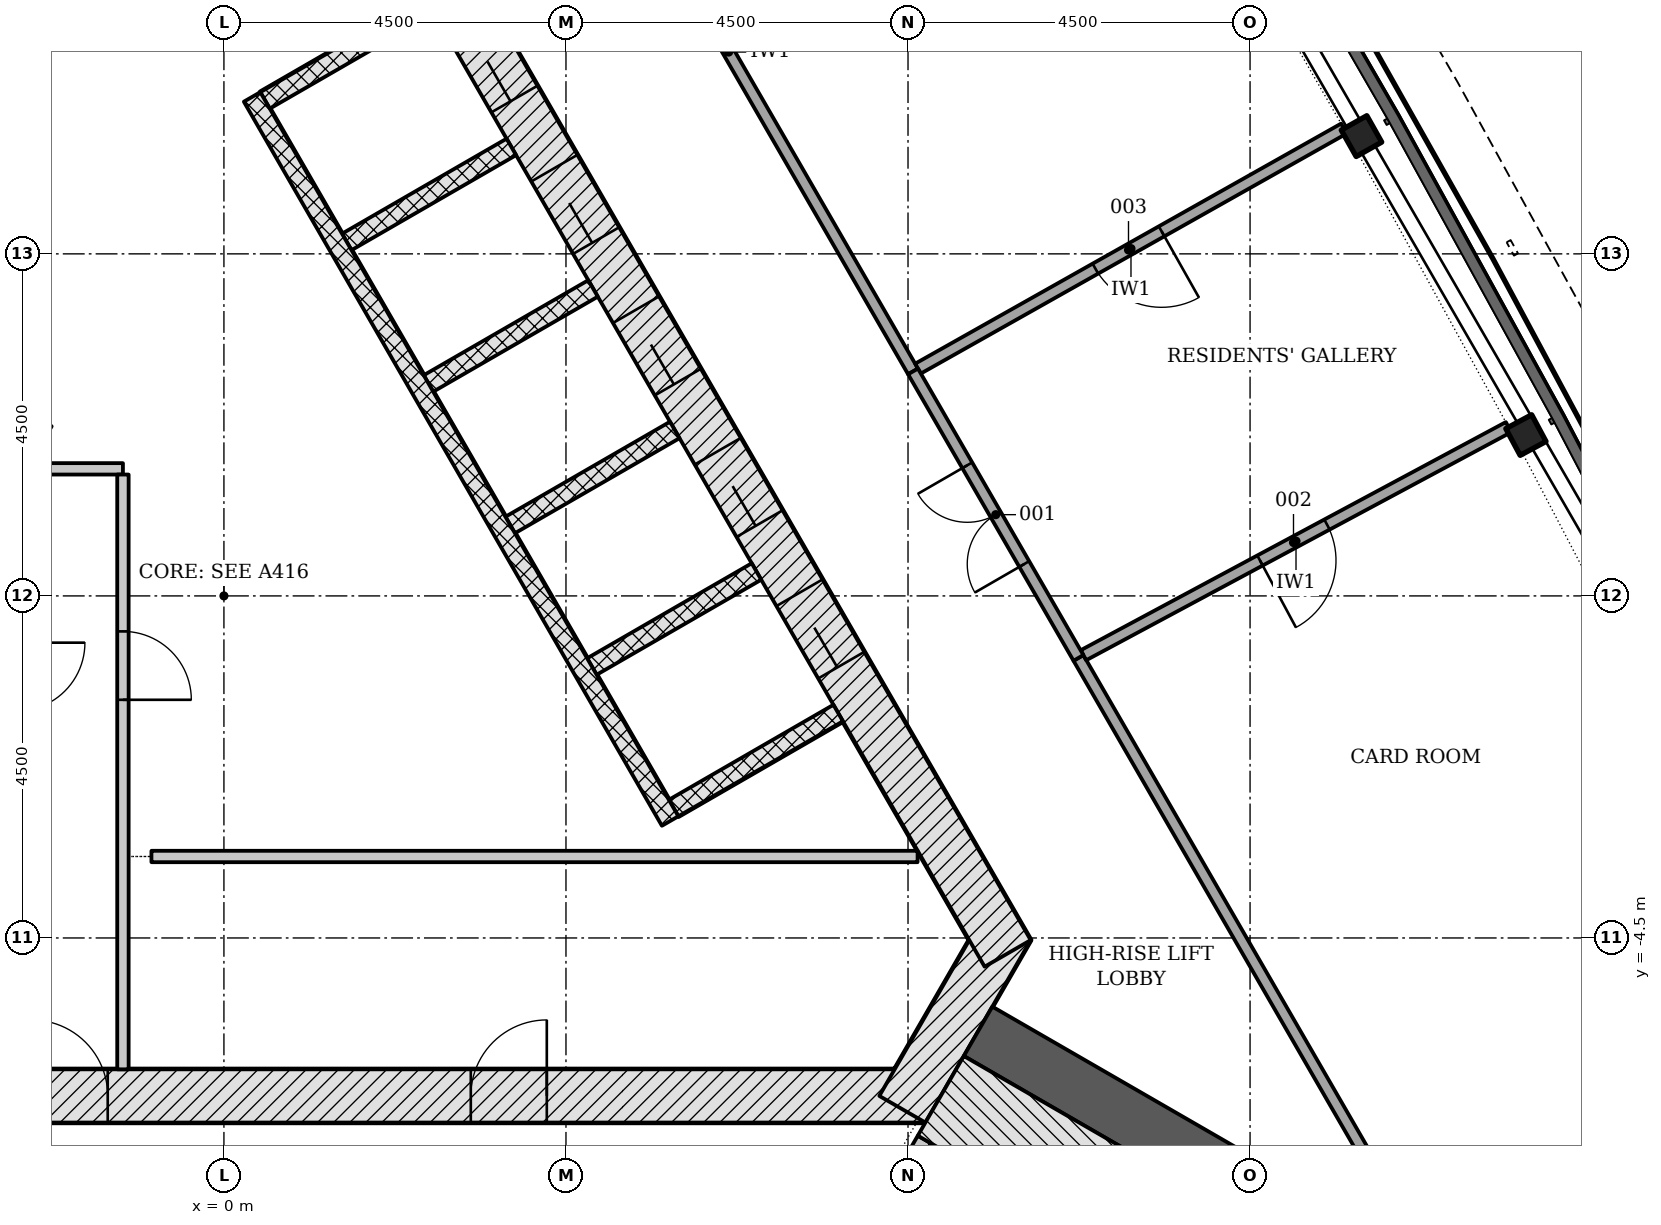
"""IFC4 building model, lengths in metres.
Left out: names, types, materials, properties, quantities, classifications, styles, units other than length and angle.
Written with IfcOpenShell. Run it as: python <this file> out.ifc"""

import sys

from ifc_helpers import new_model, si_unit, direction, frame, frame_2d, origin, origin_2d, place, context, subcontext, project, spatial, polyline, rectangle, i_section, outline, extrude, element, fill, save


model = new_model("IFC4")
c1 = context("Model", 3, precision=1e-05, world=origin(), true_north=direction((0.0, 1.0)))
c2 = subcontext(c1, "Body", "Model", "MODEL_VIEW")
j1 = project(units=[si_unit("LENGTHUNIT", "METRE"), si_unit("PLANEANGLEUNIT", "RADIAN")], contexts=[c1])
p1 = place(None, origin())
s1 = spatial("IfcSite", under=j1, at=p1, CompositionType="ELEMENT")
p2 = place(p1, origin())
s2 = spatial("IfcBuilding", under=s1, at=p2, CompositionType="ELEMENT")
p3 = place(p2, frame((0.0, 0.0, 150.9)))
s3 = spatial("IfcBuildingStorey", under=s2, at=p3, CompositionType="ELEMENT", Elevation=150.9)
p4 = place(p3, frame((-9.229, -6.578, -0.2), z_axis=(0.0, 0.0, 1.0), x_axis=(1.0, 0.0, 0.0)))
e1 = element("IfcWall", 1, at=p4, inside=s3, PredefinedType="SHEAR", context=c2, shape_type="SweptSolid", body=[
    extrude(rectangle(XDim=18.458, YDim=0.7, at=frame_2d((9.229, 0.0))), origin(), (0.0, 0.0, 1.0), 3.6),
])
p5 = place(p4, frame((6.7, 0.0, 0.2)))
e2 = element("IfcOpeningElement", 2, at=p5, cuts=e1, PredefinedType="OPENING", context=c2, shape_type="SweptSolid", body=[
    extrude(rectangle(XDim=1.0, YDim=2.1, at=frame_2d((0.5, 1.05))), frame((0.0, 0.36, 0.0), z_axis=(0.0, -1.0, 0.0), x_axis=(1.0, 0.0, 0.0)), (0.0, 0.0, 1.0), 0.72),
])
p6 = place(p4, frame((1.452, 0.0, 0.2)))
e3 = element("IfcOpeningElement", 3, at=p6, cuts=e1, PredefinedType="OPENING", context=c2, shape_type="SweptSolid", body=[
    extrude(rectangle(XDim=0.9, YDim=2.1, at=frame_2d((0.45, 1.05))), frame((0.0, 0.36, 0.0), z_axis=(0.0, -1.0, 0.0), x_axis=(1.0, 0.0, 0.0)), (0.0, 0.0, 1.0), 0.72),
])
p7 = place(p4, frame((4.45, 0.0, 0.2)))
e4 = element("IfcOpeningElement", 4, at=p7, cuts=e1, PredefinedType="OPENING", context=c2, shape_type="SweptSolid", body=[
    extrude(rectangle(XDim=1.0, YDim=2.1, at=frame_2d((0.5, 1.05))), frame((0.0, 0.36, 0.0), z_axis=(0.0, -1.0, 0.0), x_axis=(1.0, 0.0, 0.0)), (0.0, 0.0, 1.0), 0.72),
])
p8 = place(p4, frame((12.477, 0.0, 0.2)))
e5 = element("IfcOpeningElement", 5, at=p8, cuts=e1, PredefinedType="OPENING", context=c2, shape_type="SweptSolid", body=[
    extrude(rectangle(XDim=1.0, YDim=2.1, at=frame_2d((0.5, 1.05))), frame((0.0, 0.36, 0.0), z_axis=(0.0, -1.0, 0.0), x_axis=(1.0, 0.0, 0.0)), (0.0, 0.0, 1.0), 0.72),
])
p9 = place(p3, frame((8.926, -6.753, -0.2), z_axis=(0.0, 0.0, 1.0), x_axis=(0.500042739161, 0.866000726912, 0.0)))
e6 = element("IfcWall", 6, at=p9, inside=s3, PredefinedType="SHEAR", context=c2, shape_type="SweptSolid", body=[
    extrude(rectangle(XDim=2.771, YDim=0.7, at=frame_2d((1.386, 0.0))), origin(), (0.0, 0.0, 1.0), 3.6),
])
p10 = place(p3, frame((10.311, -4.703, -0.2), z_axis=(0.0, 0.0, 1.0), x_axis=(-0.500001446645, 0.866024568562, 0.0)))
e7 = element("IfcWall", 7, at=p10, inside=s3, PredefinedType="SHEAR", context=c2, shape_type="SweptSolid", body=[
    extrude(rectangle(XDim=18.458, YDim=0.7, at=frame_2d((9.229, 0.0))), origin(), (0.0, 0.0, 1.0), 3.6),
])
p11 = place(p10, frame((4.379, 0.0, 0.2)))
e8 = element("IfcOpeningElement", 8, at=p11, cuts=e7, PredefinedType="OPENING", context=c2, shape_type="SweptSolid", body=[
    extrude(rectangle(XDim=1.1, YDim=2.1, at=frame_2d((0.55, 1.05))), frame((0.0, 0.36, 0.0), z_axis=(0.0, -1.0, 0.0), x_axis=(1.0, 0.0, 0.0)), (0.0, 0.0, 1.0), 0.72),
])
p12 = place(p10, frame((6.529, 0.0, 0.2)))
e9 = element("IfcOpeningElement", 9, at=p12, cuts=e7, PredefinedType="OPENING", context=c2, shape_type="SweptSolid", body=[
    extrude(rectangle(XDim=1.1, YDim=2.1, at=frame_2d((0.55, 1.05))), frame((0.0, 0.36, 0.0), z_axis=(0.0, -1.0, 0.0), x_axis=(1.0, 0.0, 0.0)), (0.0, 0.0, 1.0), 0.72),
])
p13 = place(p10, frame((8.679, 0.0, 0.2)))
e10 = element("IfcOpeningElement", 10, at=p13, cuts=e7, PredefinedType="OPENING", context=c2, shape_type="SweptSolid", body=[
    extrude(rectangle(XDim=1.1, YDim=2.1, at=frame_2d((0.55, 1.05))), frame((0.0, 0.36, 0.0), z_axis=(0.0, -1.0, 0.0), x_axis=(1.0, 0.0, 0.0)), (0.0, 0.0, 1.0), 0.72),
])
p14 = place(p10, frame((10.829, 0.0, 0.2)))
e11 = element("IfcOpeningElement", 11, at=p14, cuts=e7, PredefinedType="OPENING", context=c2, shape_type="SweptSolid", body=[
    extrude(rectangle(XDim=1.1, YDim=2.1, at=frame_2d((0.55, 1.05))), frame((0.0, 0.36, 0.0), z_axis=(0.0, -1.0, 0.0), x_axis=(1.0, 0.0, 0.0)), (0.0, 0.0, 1.0), 0.72),
])
p15 = place(p10, frame((12.979, 0.0, 0.2)))
e12 = element("IfcOpeningElement", 12, at=p15, cuts=e7, PredefinedType="OPENING", context=c2, shape_type="SweptSolid", body=[
    extrude(rectangle(XDim=1.1, YDim=2.1, at=frame_2d((0.55, 1.05))), frame((0.0, 0.36, 0.0), z_axis=(0.0, -1.0, 0.0), x_axis=(1.0, 0.0, 0.0)), (0.0, 0.0, 1.0), 0.72),
])
p16 = place(p3, frame((-1.083, 11.281, -0.2), z_axis=(0.0, 0.0, 1.0), x_axis=(-0.500001446645, -0.866024568562, 0.0)))
e13 = element("IfcWall", 13, at=p16, inside=s3, PredefinedType="SHEAR", context=c2, shape_type="SweptSolid", body=[
    extrude(rectangle(XDim=18.458, YDim=0.7, at=frame_2d((9.229, 0.0))), origin(), (0.0, 0.0, 1.0), 3.6),
])
p17 = place(p16, frame((8.979, 0.0, 0.2)))
e14 = element("IfcOpeningElement", 14, at=p17, cuts=e13, PredefinedType="OPENING", context=c2, shape_type="SweptSolid", body=[
    extrude(rectangle(XDim=1.2, YDim=2.1, at=frame_2d((0.6, 1.05))), frame((0.0, 0.36, 0.0), z_axis=(0.0, -1.0, 0.0), x_axis=(1.0, 0.0, 0.0)), (0.0, 0.0, 1.0), 0.72),
])
p18 = place(p16, frame((11.029, 0.0, 0.2)))
e15 = element("IfcOpeningElement", 15, at=p18, cuts=e13, PredefinedType="OPENING", context=c2, shape_type="SweptSolid", body=[
    extrude(rectangle(XDim=1.2, YDim=2.1, at=frame_2d((0.6, 1.05))), frame((0.0, 0.36, 0.0), z_axis=(0.0, -1.0, 0.0), x_axis=(1.0, 0.0, 0.0)), (0.0, 0.0, 1.0), 0.72),
])
p19 = place(p3, frame((9.922, -5.728, -0.2), z_axis=(0.0, 0.0, 1.0), x_axis=(0.86602614826, -0.499998710529, 0.0)))
e16 = element("IfcWall", 16, at=p19, inside=s3, PredefinedType="SHEAR", context=c2, shape_type="SweptSolid", body=[
    extrude(rectangle(XDim=10.735, YDim=0.75, at=frame_2d((5.368, 0.0))), origin(), (0.0, 0.0, 1.0), 3.6),
])
for number, where, z_axis, x_axis in (
    (17, (17.129, 2.116, -0.2), (0.0, 0.0, 1.0), (-0.473, 0.881, 0.0)),
    (18, (14.966, 6.049, -0.2), (0.0, 0.0, 1.0), (-0.491, 0.871, 0.0)),
):
    element("IfcColumn", number, at=place(p3, frame(where, z_axis=z_axis, x_axis=x_axis)), inside=s3, PredefinedType="COLUMN", context=c2, shape_type="SweptSolid", body=[
        extrude(i_section(OverallWidth=0.399, OverallDepth=0.386, WebThickness=0.021, FlangeThickness=0.033, FilletRadius=0.015, at=origin_2d()), origin(), (0.0, 0.0, 1.0), 3.6),
    ])
p20 = place(p3, origin())
e19 = element("IfcWall", 19, at=p20, inside=s3, PredefinedType="NOTDEFINED", context=c2, shape_type="SweptSolid", body=[
    extrude(outline(polyline([(15.736, -15.976), (18.887, -15.724), (20.245, -15.414), (21.469, -14.748), (22.466, -13.775), (23.163, -12.569), (23.507, -11.219), (23.472, -9.826), (23.061, -8.494), (21.704, -5.64), (21.433, -5.769), (22.781, -8.604), (23.173, -9.875), (23.206, -11.185), (22.882, -12.455), (22.227, -13.589), (21.289, -14.504), (20.138, -15.131), (18.841, -15.427), (15.712, -15.677), (15.736, -15.976)])), origin(), (0.0, 0.0, 1.0), 3.3),
])
for number, where, z_axis, x_axis in (
    (20, (8.081, -1.541, -0.2), (0.0, 0.0, 1.0), (-0.866, -0.5, 0.0)),
    (21, (7.006, 0.321, -0.2), (0.0, 0.0, 1.0), (-0.866, -0.5, 0.0)),
):
    element("IfcWall", number, at=place(p3, frame(where, z_axis=z_axis, x_axis=x_axis)), inside=s3, PredefinedType="PARTITIONING", context=c2, shape_type="SweptSolid", body=[
        extrude(rectangle(XDim=2.5, YDim=0.25, at=frame_2d((1.25, 0.0))), origin(), (0.0, 0.0, 1.0), 3.6),
    ])
p21 = place(p3, frame((5.931, 2.183, -0.2), z_axis=(0.0, 0.0, 1.0), x_axis=(-0.866047370643, -0.499961950354, 0.0)))
e22 = element("IfcWall", 22, at=p21, inside=s3, PredefinedType="PARTITIONING", context=c2, shape_type="SweptSolid", body=[
    extrude(rectangle(XDim=2.5, YDim=0.25, at=frame_2d((1.25, 0.0))), origin(), (0.0, 0.0, 1.0), 3.6),
])
for number, where, z_axis, x_axis in (
    (23, (4.856, 4.045, -0.2), (0.0, 0.0, 1.0), (-0.866, -0.5, 0.0)),
    (24, (3.781, 5.907, -0.2), (0.0, 0.0, 1.0), (-0.866, -0.5, 0.0)),
    (25, (2.706, 7.769, -0.2), (0.0, 0.0, 1.0), (-0.866, -0.5, 0.0)),
):
    element("IfcWall", number, at=place(p3, frame(where, z_axis=z_axis, x_axis=x_axis)), inside=s3, PredefinedType="PARTITIONING", context=c2, shape_type="SweptSolid", body=[
        extrude(rectangle(XDim=2.5, YDim=0.25, at=frame_2d((1.25, 0.0))), origin(), (0.0, 0.0, 1.0), 3.6),
    ])
p22 = place(p3, frame((5.87, -2.961, 0.0), z_axis=(0.0, 0.0, 1.0), x_axis=(-0.50000615651, 0.866021849293, 0.0)))
e26 = element("IfcWall", 26, at=p22, inside=s3, PredefinedType="PARTITIONING", context=c2, shape_type="SweptSolid", body=[
    extrude(rectangle(XDim=11.0, YDim=0.25, at=frame_2d((5.5, 0.0))), origin(), (0.0, 0.0, 1.0), 3.4),
])
p23 = place(p3, frame((-2.544, 1.672, 0.0), z_axis=(0.0, 0.0, 1.0), x_axis=(1.0, 0.0, 0.0)))
e27 = element("IfcWall", 27, at=p23, inside=s3, PredefinedType="PARTITIONING", context=c2, shape_type="SweptSolid", body=[
    extrude(rectangle(XDim=1.216, YDim=0.15, at=frame_2d((0.608, 0.0))), origin(), (0.0, 0.0, 1.0), 3.4),
])
p24 = place(p3, frame((-1.329, 1.597, 0.0), z_axis=(0.0, 0.0, 1.0), x_axis=(0.0, -1.0, 0.0)))
e28 = element("IfcWall", 28, at=p24, inside=s3, PredefinedType="PARTITIONING", context=c2, shape_type="SweptSolid", body=[
    extrude(rectangle(XDim=7.825, YDim=0.15, at=frame_2d((3.913, 0.0))), origin(), (0.0, 0.0, 1.0), 3.4),
])
p25 = place(p24, frame((2.063, 0.0, 0.0)))
e29 = element("IfcOpeningElement", 29, at=p25, cuts=e28, PredefinedType="OPENING", context=c2, shape_type="SweptSolid", body=[
    extrude(rectangle(XDim=0.9, YDim=2.1, at=frame_2d((0.45, 1.05))), frame((0.0, 0.085, 0.0), z_axis=(0.0, -1.0, 0.0), x_axis=(1.0, 0.0, 0.0)), (0.0, 0.0, 1.0), 0.17),
])
p26 = place(p3, frame((-0.954, -3.428, 0.0), z_axis=(0.0, 0.0, 1.0), x_axis=(1.0, 0.0, 0.0)))
e30 = element("IfcWall", 30, at=p26, inside=s3, PredefinedType="PARTITIONING", context=c2, shape_type="SweptSolid", body=[
    extrude(rectangle(XDim=10.08, YDim=0.15, at=frame_2d((5.04, 0.0))), origin(), (0.0, 0.0, 1.0), 3.4),
])
p27 = place(p3, frame((7.44, -10.226, -0.2), z_axis=(0.0, 0.0, 1.0), x_axis=(0.500022077904, 0.866012656725, 0.0)))
e31 = element("IfcWall", 31, at=p27, inside=s3, PredefinedType="SHEAR", context=c2, shape_type="SweptSolid", body=[
    extrude(rectangle(XDim=3.55, YDim=0.2, at=frame_2d((1.775, 0.0))), origin(), (0.0, 0.0, 1.0), 3.6),
])
p28 = place(p27, frame((1.175, 0.0, 0.2)))
e32 = element("IfcOpeningElement", 32, at=p28, cuts=e31, PredefinedType="OPENING", context=c2, shape_type="SweptSolid", body=[
    extrude(rectangle(XDim=1.2, YDim=2.1, at=frame_2d((0.6, 1.05))), frame((0.0, 0.11, 0.0), z_axis=(0.0, -1.0, 0.0), x_axis=(1.0, 0.0, 0.0)), (0.0, 0.0, 1.0), 0.22),
])
p29 = place(p3, frame((9.431, -6.577, -0.2), z_axis=(0.0, 0.0, 1.0), x_axis=(0.866018442252, -0.500012057535, 0.0)))
e33 = element("IfcWall", 33, at=p29, inside=s3, PredefinedType="SHEAR", context=c2, shape_type="SweptSolid", body=[
    extrude(rectangle(XDim=7.2, YDim=1.211, at=frame_2d((3.6, 0.0))), origin(), (0.0, 0.0, 1.0), 3.6),
])
p30 = place(p3, frame((15.782, -8.679, 0.0), z_axis=(0.0, 0.0, 1.0), x_axis=(-0.500005644317, 0.866022145012, 0.0)))
e34 = element("IfcWall", 34, at=p30, inside=s3, PredefinedType="PARTITIONING", context=c2, shape_type="SweptSolid", body=[
    extrude(rectangle(XDim=9.08, YDim=0.15, at=frame_2d((4.54, 0.0))), origin(), (0.0, 0.0, 1.0), 2.847),
])
p31 = place(p3, frame((9.066, 2.953, 0.0), z_axis=(0.0, 0.0, 1.0), x_axis=(-0.500003417229, 0.866023430837, 0.0)))
e35 = element("IfcWall", 35, at=p31, inside=s3, PredefinedType="PARTITIONING", context=c2, shape_type="SweptSolid", body=[
    extrude(rectangle(XDim=9.703, YDim=0.15, at=frame_2d((4.852, 0.0))), origin(), (0.0, 0.0, 1.0), 2.847),
])
p32 = place(p3, frame((16.901, 2.221, 0.0), z_axis=(0.0, 0.0, 1.0), x_axis=(-0.881144631688, -0.472846844177, 0.0)))
e36 = element("IfcWall", 36, at=p32, inside=s3, PredefinedType="PARTITIONING", context=c2, shape_type="SweptSolid", body=[
    extrude(rectangle(XDim=6.347, YDim=0.15, at=frame_2d((3.173, 0.0))), origin(), (0.0, 0.0, 1.0), 3.4),
])
p33 = place(p32, frame((2.711, 0.0, 0.0)))
e37 = element("IfcOpeningElement", 37, at=p33, cuts=e36, PredefinedType="OPENING", context=c2, shape_type="SweptSolid", body=[
    extrude(rectangle(XDim=1.0, YDim=2.1, at=frame_2d((0.5, 1.05))), frame((0.0, 0.085, 0.0), z_axis=(0.0, -1.0, 0.0), x_axis=(1.0, 0.0, 0.0)), (0.0, 0.0, 1.0), 0.17),
])
p34 = place(p3, frame((14.735, 6.149, 0.0), z_axis=(0.0, 0.0, 1.0), x_axis=(-0.871163720424, -0.490992639676, 0.0)))
e38 = element("IfcWall", 38, at=p34, inside=s3, PredefinedType="PARTITIONING", context=c2, shape_type="SweptSolid", body=[
    extrude(rectangle(XDim=6.433, YDim=0.15, at=frame_2d((3.216, 0.0))), origin(), (0.0, 0.0, 1.0), 3.4),
])
p35 = place(p34, frame((2.754, 0.0, 0.0)))
e39 = element("IfcOpeningElement", 39, at=p35, cuts=e38, PredefinedType="OPENING", context=c2, shape_type="SweptSolid", body=[
    extrude(rectangle(XDim=1.0, YDim=2.1, at=frame_2d((0.5, 1.05))), frame((0.0, 0.085, 0.0), z_axis=(0.0, -1.0, 0.0), x_axis=(1.0, 0.0, 0.0)), (0.0, 0.0, 1.0), 0.17),
])
p36 = place(p3, frame((11.242, -0.816, 0.0), z_axis=(0.0, 0.0, 1.0), x_axis=(-0.499994385119, 0.866028645513, 0.0)))
e40 = element("IfcWall", 40, at=p36, inside=s3, PredefinedType="PARTITIONING", context=c2, shape_type="SweptSolid", body=[
    extrude(rectangle(XDim=4.352, YDim=0.15, at=frame_2d((2.176, 0.0))), origin(), (0.0, 0.0, 1.0), 2.847),
])
p37 = place(p36, frame((1.426, 0.0, 0.0)))
e41 = element("IfcOpeningElement", 41, at=p37, cuts=e40, PredefinedType="OPENING", context=c2, shape_type="SweptSolid", body=[
    extrude(rectangle(XDim=1.5, YDim=2.1, at=frame_2d((0.75, 1.05))), frame((0.0, 0.085, 0.0), z_axis=(0.0, -1.0, 0.0), x_axis=(1.0, 0.0, 0.0)), (0.0, 0.0, 1.0), 0.17),
])
p38 = place(p11, origin())
e42 = element("IfcDoor", 42, at=p38, inside=s3, OperationType="DOUBLE_DOOR_SLIDING", PredefinedType="DOOR", context=c2, shape_type="SweptSolid", body=[
    extrude(rectangle(XDim=1.1, YDim=2.1, at=frame_2d((0.55, 1.05))), frame((0.0, 0.025, 0.0), z_axis=(0.0, -1.0, 0.0), x_axis=(1.0, 0.0, 0.0)), (0.0, 0.0, 1.0), 0.05),
])
fill(e8, e42)
p39 = place(p12, origin())
e43 = element("IfcDoor", 43, at=p39, inside=s3, OperationType="DOUBLE_DOOR_SLIDING", PredefinedType="DOOR", context=c2, shape_type="SweptSolid", body=[
    extrude(rectangle(XDim=1.1, YDim=2.1, at=frame_2d((0.55, 1.05))), frame((0.0, 0.025, 0.0), z_axis=(0.0, -1.0, 0.0), x_axis=(1.0, 0.0, 0.0)), (0.0, 0.0, 1.0), 0.05),
])
fill(e9, e43)
p40 = place(p13, origin())
e44 = element("IfcDoor", 44, at=p40, inside=s3, OperationType="DOUBLE_DOOR_SLIDING", PredefinedType="DOOR", context=c2, shape_type="SweptSolid", body=[
    extrude(rectangle(XDim=1.1, YDim=2.1, at=frame_2d((0.55, 1.05))), frame((0.0, 0.025, 0.0), z_axis=(0.0, -1.0, 0.0), x_axis=(1.0, 0.0, 0.0)), (0.0, 0.0, 1.0), 0.05),
])
fill(e10, e44)
p41 = place(p14, origin())
e45 = element("IfcDoor", 45, at=p41, inside=s3, OperationType="DOUBLE_DOOR_SLIDING", PredefinedType="DOOR", context=c2, shape_type="SweptSolid", body=[
    extrude(rectangle(XDim=1.1, YDim=2.1, at=frame_2d((0.55, 1.05))), frame((0.0, 0.025, 0.0), z_axis=(0.0, -1.0, 0.0), x_axis=(1.0, 0.0, 0.0)), (0.0, 0.0, 1.0), 0.05),
])
fill(e11, e45)
p42 = place(p15, origin())
e46 = element("IfcDoor", 46, at=p42, inside=s3, OperationType="DOUBLE_DOOR_SLIDING", PredefinedType="DOOR", context=c2, shape_type="SweptSolid", body=[
    extrude(rectangle(XDim=1.1, YDim=2.1, at=frame_2d((0.55, 1.05))), frame((0.0, 0.025, 0.0), z_axis=(0.0, -1.0, 0.0), x_axis=(1.0, 0.0, 0.0)), (0.0, 0.0, 1.0), 0.05),
])
fill(e12, e46)
p43 = place(p5, origin())
e47 = element("IfcDoor", 47, at=p43, inside=s3, OperationType="SINGLE_SWING_LEFT", PredefinedType="DOOR", context=c2, shape_type="SweptSolid", body=[
    extrude(rectangle(XDim=1.0, YDim=2.1, at=frame_2d((0.5, 1.05))), frame((0.0, 0.075, 0.0), z_axis=(0.0, -1.0, 0.0), x_axis=(1.0, 0.0, 0.0)), (0.0, 0.0, 1.0), 0.15),
])
fill(e2, e47)
p44 = place(p8, origin())
e48 = element("IfcDoor", 48, at=p44, inside=s3, OperationType="SINGLE_SWING_RIGHT", PredefinedType="DOOR", context=c2, shape_type="SweptSolid", body=[
    extrude(rectangle(XDim=1.0, YDim=2.1, at=frame_2d((0.5, 1.05))), frame((0.0, 0.075, 0.0), z_axis=(0.0, -1.0, 0.0), x_axis=(1.0, 0.0, 0.0)), (0.0, 0.0, 1.0), 0.15),
])
fill(e5, e48)
p45 = place(p25, origin())
e49 = element("IfcDoor", 49, at=p45, inside=s3, OperationType="SINGLE_SWING_RIGHT", PredefinedType="DOOR", context=c2, shape_type="SweptSolid", body=[
    extrude(rectangle(XDim=0.9, YDim=2.1, at=frame_2d((0.45, 1.05))), frame((0.0, 0.025, 0.0), z_axis=(0.0, -1.0, 0.0), x_axis=(1.0, 0.0, 0.0)), (0.0, 0.0, 1.0), 0.05),
])
fill(e29, e49)
p46 = place(p37, origin())
e50 = element("IfcDoor", 50, at=p46, inside=s3, OperationType="DOUBLE_DOOR_SINGLE_SWING", PredefinedType="DOOR", context=c2, shape_type="SweptSolid", body=[
    extrude(rectangle(XDim=1.5, YDim=2.1, at=frame_2d((0.75, 1.05))), frame((0.0, 0.025, 0.0), z_axis=(0.0, -1.0, 0.0), x_axis=(1.0, 0.0, 0.0)), (0.0, 0.0, 1.0), 0.05),
])
fill(e41, e50)
p47 = place(p33, origin())
e51 = element("IfcDoor", 51, at=p47, inside=s3, OperationType="SINGLE_SWING_RIGHT", PredefinedType="DOOR", context=c2, shape_type="SweptSolid", body=[
    extrude(rectangle(XDim=1.0, YDim=2.1, at=frame_2d((0.5, 1.05))), frame((0.0, 0.025, 0.0), z_axis=(0.0, -1.0, 0.0), x_axis=(1.0, 0.0, 0.0)), (0.0, 0.0, 1.0), 0.05),
])
fill(e37, e51)
p48 = place(p35, origin())
e52 = element("IfcDoor", 52, at=p48, inside=s3, OperationType="SINGLE_SWING_LEFT", PredefinedType="DOOR", context=c2, shape_type="SweptSolid", body=[
    extrude(rectangle(XDim=1.0, YDim=2.1, at=frame_2d((0.5, 1.05))), frame((0.0, 0.025, 0.0), z_axis=(0.0, -1.0, 0.0), x_axis=(1.0, 0.0, 0.0)), (0.0, 0.0, 1.0), 0.05),
])
fill(e39, e52)
save(model, sys.argv[1])
